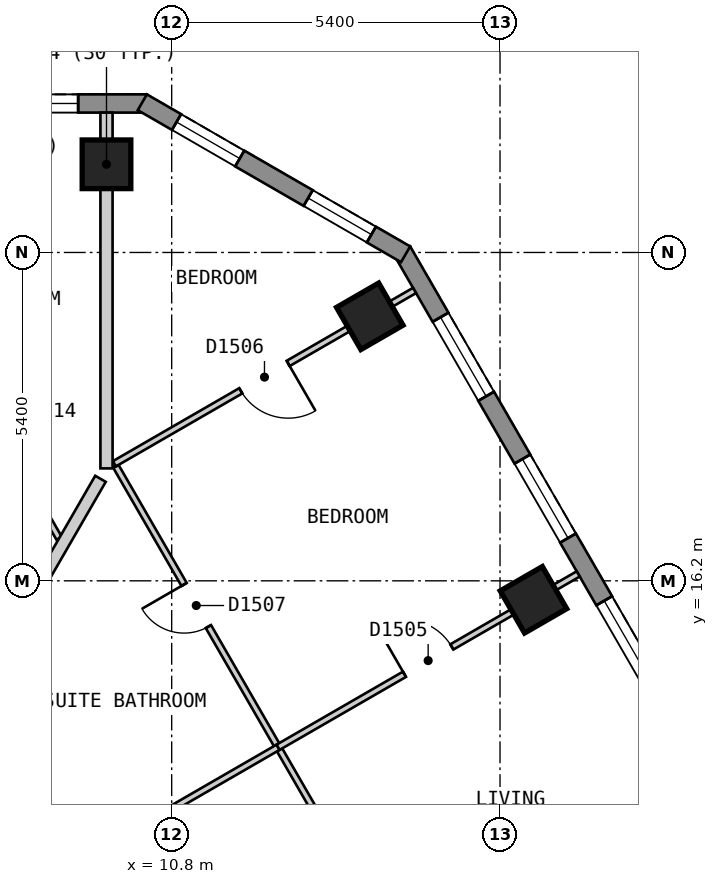
"""IFC4 building model, lengths in metres.
Left out: names, types, materials, properties, quantities, classifications, styles, units other than length and angle.
Written with IfcOpenShell. Run it as: python <this file> out.ifc"""

import sys

from ifc_helpers import new_model, si_unit, direction, frame, frame_2d, origin, origin_2d, place, context, subcontext, project, spatial, polyline, rectangle, outline, extrude, element, fill, save


model = new_model("IFC4")
c1 = context("Model", 3, precision=1e-05, world=origin(), true_north=direction((0.0, 1.0)))
c2 = subcontext(c1, "Body", "Model", "MODEL_VIEW")
j1 = project(units=[si_unit("LENGTHUNIT", "METRE"), si_unit("PLANEANGLEUNIT", "RADIAN")], contexts=[c1])
p1 = place(None, origin())
s1 = spatial("IfcSite", under=j1, at=p1, CompositionType="ELEMENT")
p2 = place(p1, origin())
s2 = spatial("IfcBuilding", under=s1, at=p2, CompositionType="ELEMENT")
p3 = place(p2, frame((0.0, 0.0, 196.2)))
s3 = spatial("IfcBuildingStorey", under=s2, at=p3, CompositionType="ELEMENT", Elevation=196.2)
for number, where, z_axis, x_axis in (
    (1, (9.728, 23.05, 0.0), (0.0, 0.0, 1.0), (-1.0, 0.0, 0.0)),
    (2, (16.75, 15.888, 0.0), (0.0, 0.0, 1.0), (-0.5, 0.866, 0.0)),
    (3, (14.058, 20.55, 0.0), (0.0, 0.0, 1.0), (-0.5, 0.866, 0.0)),
):
    element("IfcColumn", number, at=place(p3, frame(where, z_axis=z_axis, x_axis=x_axis)), inside=s3, PredefinedType="COLUMN", context=c2, shape_type="SweptSolid", body=[
        extrude(rectangle(XDim=0.8, YDim=0.8, at=origin_2d()), origin(), (0.0, 0.0, 1.0), 3.0),
    ])
p4 = place(p3, frame((10.392, 24.05, 0.0), z_axis=(0.0, 0.0, 1.0), x_axis=(-1.0, 0.0, 0.0)))
e4 = element("IfcWall", 4, at=p4, inside=s3, PredefinedType="SOLIDWALL", context=c2, shape_type="SweptSolid", body=[
    extrude(outline(polyline([(0.0, -0.15), (20.784, -0.15), (20.704, 0.15), (0.08, 0.15), (0.0, -0.15)])), origin(), (0.0, 0.0, 1.0), 2.6),
])
p5 = place(p4, frame((1.13, 0.0, 0.15)))
e5 = element("IfcOpeningElement", 5, at=p5, cuts=e4, PredefinedType="OPENING", context=c2, shape_type="SweptSolid", body=[
    extrude(rectangle(XDim=1.5, YDim=2.1, at=frame_2d((0.75, 1.05))), frame((0.0, 0.16, 0.0), z_axis=(0.0, -1.0, 0.0), x_axis=(1.0, 0.0, 0.0)), (0.0, 0.0, 1.0), 0.32),
])
p6 = place(p4, frame((3.562, 0.0, 0.15)))
e6 = element("IfcOpeningElement", 6, at=p6, cuts=e4, PredefinedType="OPENING", context=c2, shape_type="SweptSolid", body=[
    extrude(rectangle(XDim=1.5, YDim=2.1, at=frame_2d((0.75, 1.05))), frame((0.0, 0.16, 0.0), z_axis=(0.0, -1.0, 0.0), x_axis=(1.0, 0.0, 0.0)), (0.0, 0.0, 1.0), 0.32),
])
p7 = place(p4, frame((5.994, 0.0, 0.15)))
e7 = element("IfcOpeningElement", 7, at=p7, cuts=e4, PredefinedType="OPENING", context=c2, shape_type="SweptSolid", body=[
    extrude(rectangle(XDim=1.5, YDim=2.1, at=frame_2d((0.75, 1.05))), frame((0.0, 0.16, 0.0), z_axis=(0.0, -1.0, 0.0), x_axis=(1.0, 0.0, 0.0)), (0.0, 0.0, 1.0), 0.32),
])
p8 = place(p4, frame((8.426, 0.0, 0.15)))
e8 = element("IfcOpeningElement", 8, at=p8, cuts=e4, PredefinedType="OPENING", context=c2, shape_type="SweptSolid", body=[
    extrude(rectangle(XDim=1.5, YDim=2.1, at=frame_2d((0.75, 1.05))), frame((0.0, 0.16, 0.0), z_axis=(0.0, -1.0, 0.0), x_axis=(1.0, 0.0, 0.0)), (0.0, 0.0, 1.0), 0.32),
])
p9 = place(p4, frame((10.858, 0.0, 0.15)))
e9 = element("IfcOpeningElement", 9, at=p9, cuts=e4, PredefinedType="OPENING", context=c2, shape_type="SweptSolid", body=[
    extrude(rectangle(XDim=1.5, YDim=2.1, at=frame_2d((0.75, 1.05))), frame((0.0, 0.16, 0.0), z_axis=(0.0, -1.0, 0.0), x_axis=(1.0, 0.0, 0.0)), (0.0, 0.0, 1.0), 0.32),
])
p10 = place(p4, frame((13.29, 0.0, 0.15)))
e10 = element("IfcOpeningElement", 10, at=p10, cuts=e4, PredefinedType="OPENING", context=c2, shape_type="SweptSolid", body=[
    extrude(rectangle(XDim=1.5, YDim=2.1, at=frame_2d((0.75, 1.05))), frame((0.0, 0.16, 0.0), z_axis=(0.0, -1.0, 0.0), x_axis=(1.0, 0.0, 0.0)), (0.0, 0.0, 1.0), 0.32),
])
p11 = place(p4, frame((15.722, 0.0, 0.15)))
e11 = element("IfcOpeningElement", 11, at=p11, cuts=e4, PredefinedType="OPENING", context=c2, shape_type="SweptSolid", body=[
    extrude(rectangle(XDim=1.5, YDim=2.1, at=frame_2d((0.75, 1.05))), frame((0.0, 0.16, 0.0), z_axis=(0.0, -1.0, 0.0), x_axis=(1.0, 0.0, 0.0)), (0.0, 0.0, 1.0), 0.32),
])
p12 = place(p4, frame((18.154, 0.0, 0.15)))
e12 = element("IfcOpeningElement", 12, at=p12, cuts=e4, PredefinedType="OPENING", context=c2, shape_type="SweptSolid", body=[
    extrude(rectangle(XDim=1.5, YDim=2.1, at=frame_2d((0.75, 1.05))), frame((0.0, 0.16, 0.0), z_axis=(0.0, -1.0, 0.0), x_axis=(1.0, 0.0, 0.0)), (0.0, 0.0, 1.0), 0.32),
])
p13 = place(p3, frame((26.024, 1.825, 0.0), z_axis=(0.0, 0.0, 1.0), x_axis=(-0.500010537973, 0.866019319597, 0.0)))
e13 = element("IfcWall", 13, at=p13, inside=s3, PredefinedType="SOLIDWALL", context=c2, shape_type="SweptSolid", body=[
    extrude(outline(polyline([(0.0, -0.15), (22.863, -0.15), (22.783, 0.15), (0.08, 0.15), (0.0, -0.15)])), origin(), (0.0, 0.0, 1.0), 2.6),
])
p14 = place(p13, frame((1.259, 0.0, 0.15)))
e14 = element("IfcOpeningElement", 14, at=p14, cuts=e13, PredefinedType="OPENING", context=c2, shape_type="SweptSolid", body=[
    extrude(rectangle(XDim=1.5, YDim=2.1, at=frame_2d((0.75, 1.05))), frame((0.0, 0.16, 0.0), z_axis=(0.0, -1.0, 0.0), x_axis=(1.0, 0.0, 0.0)), (0.0, 0.0, 1.0), 0.32),
])
p15 = place(p13, frame((3.952, 0.0, 0.15)))
e15 = element("IfcOpeningElement", 15, at=p15, cuts=e13, PredefinedType="OPENING", context=c2, shape_type="SweptSolid", body=[
    extrude(rectangle(XDim=1.5, YDim=2.1, at=frame_2d((0.75, 1.05))), frame((0.0, 0.16, 0.0), z_axis=(0.0, -1.0, 0.0), x_axis=(1.0, 0.0, 0.0)), (0.0, 0.0, 1.0), 0.32),
])
p16 = place(p13, frame((6.644, 0.0, 0.15)))
e16 = element("IfcOpeningElement", 16, at=p16, cuts=e13, PredefinedType="OPENING", context=c2, shape_type="SweptSolid", body=[
    extrude(rectangle(XDim=1.5, YDim=2.1, at=frame_2d((0.75, 1.05))), frame((0.0, 0.16, 0.0), z_axis=(0.0, -1.0, 0.0), x_axis=(1.0, 0.0, 0.0)), (0.0, 0.0, 1.0), 0.32),
])
p17 = place(p13, frame((9.335, 0.0, 0.15)))
e17 = element("IfcOpeningElement", 17, at=p17, cuts=e13, PredefinedType="OPENING", context=c2, shape_type="SweptSolid", body=[
    extrude(rectangle(XDim=1.5, YDim=2.1, at=frame_2d((0.75, 1.05))), frame((0.0, 0.16, 0.0), z_axis=(0.0, -1.0, 0.0), x_axis=(1.0, 0.0, 0.0)), (0.0, 0.0, 1.0), 0.32),
])
p18 = place(p13, frame((12.028, 0.0, 0.15)))
e18 = element("IfcOpeningElement", 18, at=p18, cuts=e13, PredefinedType="OPENING", context=c2, shape_type="SweptSolid", body=[
    extrude(rectangle(XDim=1.5, YDim=2.1, at=frame_2d((0.75, 1.05))), frame((0.0, 0.16, 0.0), z_axis=(0.0, -1.0, 0.0), x_axis=(1.0, 0.0, 0.0)), (0.0, 0.0, 1.0), 0.32),
])
p19 = place(p13, frame((14.72, 0.0, 0.15)))
e19 = element("IfcOpeningElement", 19, at=p19, cuts=e13, PredefinedType="OPENING", context=c2, shape_type="SweptSolid", body=[
    extrude(rectangle(XDim=1.5, YDim=2.1, at=frame_2d((0.75, 1.05))), frame((0.0, 0.16, 0.0), z_axis=(0.0, -1.0, 0.0), x_axis=(1.0, 0.0, 0.0)), (0.0, 0.0, 1.0), 0.32),
])
p20 = place(p13, frame((17.411, 0.0, 0.15)))
e20 = element("IfcOpeningElement", 20, at=p20, cuts=e13, PredefinedType="OPENING", context=c2, shape_type="SweptSolid", body=[
    extrude(rectangle(XDim=1.5, YDim=2.1, at=frame_2d((0.75, 1.05))), frame((0.0, 0.16, 0.0), z_axis=(0.0, -1.0, 0.0), x_axis=(1.0, 0.0, 0.0)), (0.0, 0.0, 1.0), 0.32),
])
p21 = place(p13, frame((20.104, 0.0, 0.15)))
e21 = element("IfcOpeningElement", 21, at=p21, cuts=e13, PredefinedType="OPENING", context=c2, shape_type="SweptSolid", body=[
    extrude(rectangle(XDim=1.5, YDim=2.1, at=frame_2d((0.75, 1.05))), frame((0.0, 0.16, 0.0), z_axis=(0.0, -1.0, 0.0), x_axis=(1.0, 0.0, 0.0)), (0.0, 0.0, 1.0), 0.32),
])
p22 = place(p3, frame((14.647, 21.57, 0.0), z_axis=(0.0, 0.0, 1.0), x_axis=(-0.866022959057, 0.500004234368, 0.0)))
e22 = element("IfcWall", 22, at=p22, inside=s3, PredefinedType="SOLIDWALL", context=c2, shape_type="SweptSolid", body=[
    extrude(outline(polyline([(0.0, -0.15), (5.0, -0.15), (4.92, 0.15), (0.08, 0.15), (0.0, -0.15)])), origin(), (0.0, 0.0, 1.0), 2.6),
])
p23 = place(p22, frame((0.65, 0.0, 0.15)))
e23 = element("IfcOpeningElement", 23, at=p23, cuts=e22, PredefinedType="OPENING", context=c2, shape_type="SweptSolid", body=[
    extrude(rectangle(XDim=1.2, YDim=2.1, at=frame_2d((0.6, 1.05))), frame((0.0, 0.16, 0.0), z_axis=(0.0, -1.0, 0.0), x_axis=(1.0, 0.0, 0.0)), (0.0, 0.0, 1.0), 0.32),
])
p24 = place(p22, frame((3.15, 0.0, 0.15)))
e24 = element("IfcOpeningElement", 24, at=p24, cuts=e22, PredefinedType="OPENING", context=c2, shape_type="SweptSolid", body=[
    extrude(rectangle(XDim=1.2, YDim=2.1, at=frame_2d((0.6, 1.05))), frame((0.0, 0.16, 0.0), z_axis=(0.0, -1.0, 0.0), x_axis=(1.0, 0.0, 0.0)), (0.0, 0.0, 1.0), 0.32),
])
p25 = place(p3, frame((5.485, 17.3, 0.0), z_axis=(0.0, 0.0, 1.0), x_axis=(0.499998905622, -0.866026035623, 0.0)))
e25 = element("IfcWall", 25, at=p25, inside=s3, PredefinedType="PARTITIONING", context=c2, shape_type="SweptSolid", body=[
    extrude(rectangle(XDim=10.524, YDim=0.2, at=frame_2d((5.262, 0.0))), origin(), (0.0, 0.0, 1.0), 2.6),
])
p26 = place(p25, frame((8.974, 0.0, 0.0)))
e26 = element("IfcOpeningElement", 26, at=p26, cuts=e25, PredefinedType="OPENING", context=c2, shape_type="SweptSolid", body=[
    extrude(rectangle(XDim=1.0, YDim=2.1, at=frame_2d((0.5, 1.05))), frame((0.0, 0.11, 0.0), z_axis=(0.0, -1.0, 0.0), x_axis=(1.0, 0.0, 0.0)), (0.0, 0.0, 1.0), 0.22),
])
p27 = place(p3, frame((7.073, 20.15, 0.0), z_axis=(0.0, 0.0, 1.0), x_axis=(0.499917691695, -0.866072919292, 0.0)))
e27 = element("IfcWall", 27, at=p27, inside=s3, PredefinedType="PARTITIONING", context=c2, shape_type="SweptSolid", body=[
    extrude(rectangle(XDim=3.753, YDim=0.1, at=frame_2d((1.876, 0.0))), origin(), (0.0, 0.0, 1.0), 2.6),
])
p28 = place(p27, frame((0.96, 0.0, 0.0)))
e28 = element("IfcOpeningElement", 28, at=p28, cuts=e27, PredefinedType="OPENING", context=c2, shape_type="SweptSolid", body=[
    extrude(rectangle(XDim=0.8, YDim=2.1, at=frame_2d((0.4, 1.05))), frame((0.0, 0.06, 0.0), z_axis=(0.0, -1.0, 0.0), x_axis=(1.0, 0.0, 0.0)), (0.0, 0.0, 1.0), 0.12),
])
p29 = place(p3, frame((9.883, 18.082, 0.0), z_axis=(0.0, 0.0, 1.0), x_axis=(0.500004428835, -0.86602284678, 0.0)))
e29 = element("IfcWall", 29, at=p29, inside=s3, PredefinedType="PARTITIONING", context=c2, shape_type="SweptSolid", body=[
    extrude(rectangle(XDim=10.618, YDim=0.1, at=frame_2d((5.309, 0.0))), origin(), (0.0, 0.0, 1.0), 2.6),
])
p30 = place(p29, frame((7.657, 0.0, 0.0)))
e30 = element("IfcOpeningElement", 30, at=p30, cuts=e29, PredefinedType="OPENING", context=c2, shape_type="SweptSolid", body=[
    extrude(rectangle(XDim=0.9, YDim=2.1, at=frame_2d((0.45, 1.05))), frame((0.0, 0.06, 0.0), z_axis=(0.0, -1.0, 0.0), x_axis=(1.0, 0.0, 0.0)), (0.0, 0.0, 1.0), 0.12),
])
p31 = place(p29, frame((2.242, 0.0, 0.0)))
e31 = element("IfcOpeningElement", 31, at=p31, cuts=e29, PredefinedType="OPENING", context=c2, shape_type="SweptSolid", body=[
    extrude(rectangle(XDim=0.8, YDim=2.1, at=frame_2d((0.4, 1.05))), frame((0.0, 0.06, 0.0), z_axis=(0.0, -1.0, 0.0), x_axis=(1.0, 0.0, 0.0)), (0.0, 0.0, 1.0), 0.12),
])
p32 = place(p3, frame((8.999, 11.413, 0.0), z_axis=(0.0, 0.0, 1.0), x_axis=(0.86606561423, 0.499930346997, 0.0)))
e32 = element("IfcWall", 32, at=p32, inside=s3, PredefinedType="PARTITIONING", context=c2, shape_type="SweptSolid", body=[
    extrude(rectangle(XDim=4.1, YDim=0.1, at=frame_2d((2.05, 0.0))), origin(), (0.0, 0.0, 1.0), 2.6),
])
p33 = place(p3, frame((9.858, 18.125, 0.0), z_axis=(0.0, 0.0, 1.0), x_axis=(0.866004402611, 0.500036373335, 0.0)))
e33 = element("IfcWall", 33, at=p33, inside=s3, PredefinedType="PARTITIONING", context=c2, shape_type="SweptSolid", body=[
    extrude(rectangle(XDim=5.7, YDim=0.1, at=frame_2d((2.85, 0.0))), origin(), (0.0, 0.0, 1.0), 2.6),
])
p34 = place(p33, frame((2.4, 0.0, 0.0)))
e34 = element("IfcOpeningElement", 34, at=p34, cuts=e33, PredefinedType="OPENING", context=c2, shape_type="SweptSolid", body=[
    extrude(rectangle(XDim=0.9, YDim=2.1, at=frame_2d((0.45, 1.05))), frame((0.0, 0.06, 0.0), z_axis=(0.0, -1.0, 0.0), x_axis=(1.0, 0.0, 0.0)), (0.0, 0.0, 1.0), 0.12),
])
p35 = place(p3, frame((7.448, 14.1, 0.0), z_axis=(0.0, 0.0, 1.0), x_axis=(0.499961462843, 0.866047652079, 0.0)))
e35 = element("IfcWall", 35, at=p35, inside=s3, PredefinedType="PARTITIONING", context=c2, shape_type="SweptSolid", body=[
    extrude(rectangle(XDim=4.362, YDim=0.2, at=frame_2d((2.181, 0.0))), origin(), (0.0, 0.0, 1.0), 2.6),
])
p36 = place(p3, frame((9.728, 18.049, 0.0), z_axis=(0.0, 0.0, 1.0), x_axis=(0.0, 1.0, 0.0)))
e36 = element("IfcWall", 36, at=p36, inside=s3, PredefinedType="PARTITIONING", context=c2, shape_type="SweptSolid", body=[
    extrude(rectangle(XDim=5.851, YDim=0.2, at=frame_2d((2.925, 0.0))), origin(), (0.0, 0.0, 1.0), 2.6),
])
p37 = place(p3, frame((12.55, 13.463, 0.0), z_axis=(0.0, 0.0, 1.0), x_axis=(0.866004402611, 0.500036373335, 0.0)))
e37 = element("IfcWall", 37, at=p37, inside=s3, PredefinedType="PARTITIONING", context=c2, shape_type="SweptSolid", body=[
    extrude(rectangle(XDim=5.7, YDim=0.1, at=frame_2d((2.85, 0.0))), origin(), (0.0, 0.0, 1.0), 2.6),
])
p38 = place(p37, frame((2.4, 0.0, 0.0)))
e38 = element("IfcOpeningElement", 38, at=p38, cuts=e37, PredefinedType="OPENING", context=c2, shape_type="SweptSolid", body=[
    extrude(rectangle(XDim=0.9, YDim=2.1, at=frame_2d((0.45, 1.05))), frame((0.0, 0.06, 0.0), z_axis=(0.0, -1.0, 0.0), x_axis=(1.0, 0.0, 0.0)), (0.0, 0.0, 1.0), 0.12),
])
p39 = place(p5, origin())
e39 = element("IfcWindow", 39, at=p39, inside=s3, PartitioningType="SINGLE_PANEL", PredefinedType="WINDOW", context=c2, shape_type="SweptSolid", body=[
    extrude(rectangle(XDim=1.5, YDim=2.1, at=frame_2d((0.75, 1.05))), frame((0.0, 0.03, 0.0), z_axis=(0.0, -1.0, 0.0), x_axis=(1.0, 0.0, 0.0)), (0.0, 0.0, 1.0), 0.06),
])
fill(e5, e39)
p40 = place(p19, origin())
e40 = element("IfcWindow", 40, at=p40, inside=s3, PartitioningType="SINGLE_PANEL", PredefinedType="WINDOW", context=c2, shape_type="SweptSolid", body=[
    extrude(rectangle(XDim=1.5, YDim=2.1, at=frame_2d((0.75, 1.05))), frame((0.0, 0.03, 0.0), z_axis=(0.0, -1.0, 0.0), x_axis=(1.0, 0.0, 0.0)), (0.0, 0.0, 1.0), 0.06),
])
fill(e19, e40)
p41 = place(p20, origin())
e41 = element("IfcWindow", 41, at=p41, inside=s3, PartitioningType="SINGLE_PANEL", PredefinedType="WINDOW", context=c2, shape_type="SweptSolid", body=[
    extrude(rectangle(XDim=1.5, YDim=2.1, at=frame_2d((0.75, 1.05))), frame((0.0, 0.03, 0.0), z_axis=(0.0, -1.0, 0.0), x_axis=(1.0, 0.0, 0.0)), (0.0, 0.0, 1.0), 0.06),
])
fill(e20, e41)
p42 = place(p21, origin())
e42 = element("IfcWindow", 42, at=p42, inside=s3, PartitioningType="SINGLE_PANEL", PredefinedType="WINDOW", context=c2, shape_type="SweptSolid", body=[
    extrude(rectangle(XDim=1.5, YDim=2.1, at=frame_2d((0.75, 1.05))), frame((0.0, 0.03, 0.0), z_axis=(0.0, -1.0, 0.0), x_axis=(1.0, 0.0, 0.0)), (0.0, 0.0, 1.0), 0.06),
])
fill(e21, e42)
p43 = place(p23, origin())
e43 = element("IfcWindow", 43, at=p43, inside=s3, PartitioningType="SINGLE_PANEL", PredefinedType="WINDOW", context=c2, shape_type="SweptSolid", body=[
    extrude(rectangle(XDim=1.2, YDim=2.1, at=frame_2d((0.6, 1.05))), frame((0.0, 0.03, 0.0), z_axis=(0.0, -1.0, 0.0), x_axis=(1.0, 0.0, 0.0)), (0.0, 0.0, 1.0), 0.06),
])
fill(e23, e43)
p44 = place(p24, origin())
e44 = element("IfcWindow", 44, at=p44, inside=s3, PartitioningType="SINGLE_PANEL", PredefinedType="WINDOW", context=c2, shape_type="SweptSolid", body=[
    extrude(rectangle(XDim=1.2, YDim=2.1, at=frame_2d((0.6, 1.05))), frame((0.0, 0.03, 0.0), z_axis=(0.0, -1.0, 0.0), x_axis=(1.0, 0.0, 0.0)), (0.0, 0.0, 1.0), 0.06),
])
fill(e24, e44)
p45 = place(p38, origin())
e45 = element("IfcDoor", 45, at=p45, inside=s3, OperationType="SINGLE_SWING_LEFT", PredefinedType="DOOR", context=c2, shape_type="SweptSolid", body=[
    extrude(rectangle(XDim=0.9, YDim=2.1, at=frame_2d((0.45, 1.05))), frame((0.0, 0.025, 0.0), z_axis=(0.0, -1.0, 0.0), x_axis=(1.0, 0.0, 0.0)), (0.0, 0.0, 1.0), 0.05),
])
fill(e38, e45)
p46 = place(p34, origin())
e46 = element("IfcDoor", 46, at=p46, inside=s3, OperationType="SINGLE_SWING_RIGHT", PredefinedType="DOOR", context=c2, shape_type="SweptSolid", body=[
    extrude(rectangle(XDim=0.9, YDim=2.1, at=frame_2d((0.45, 1.05))), frame((0.0, 0.025, 0.0), z_axis=(0.0, -1.0, 0.0), x_axis=(1.0, 0.0, 0.0)), (0.0, 0.0, 1.0), 0.05),
])
fill(e34, e46)
p47 = place(p31, origin())
e47 = element("IfcDoor", 47, at=p47, inside=s3, OperationType="SINGLE_SWING_LEFT", PredefinedType="DOOR", context=c2, shape_type="SweptSolid", body=[
    extrude(rectangle(XDim=0.8, YDim=2.1, at=frame_2d((0.4, 1.05))), frame((0.0, 0.025, 0.0), z_axis=(0.0, -1.0, 0.0), x_axis=(1.0, 0.0, 0.0)), (0.0, 0.0, 1.0), 0.05),
])
fill(e31, e47)
save(model, sys.argv[1])
